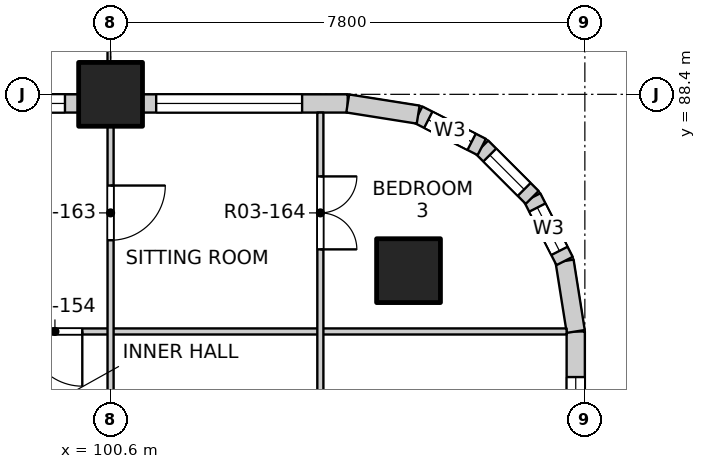
"""IFC4 building model, lengths in metres.
Left out: names, types, materials, properties, quantities, classifications, styles, units other than length and angle.
Written with IfcOpenShell. Run it as: python <this file> out.ifc"""

import sys

from ifc_helpers import new_model, si_unit, direction, frame, frame_2d, origin, origin_2d, place, context, subcontext, project, spatial, rectangle, extrude, element, fill, save


model = new_model("IFC4")
c1 = context("Model", 3, precision=1e-05, world=origin(), true_north=direction((0.0, 1.0)))
c2 = subcontext(c1, "Body", "Model", "MODEL_VIEW")
j1 = project(units=[si_unit("LENGTHUNIT", "METRE"), si_unit("PLANEANGLEUNIT", "RADIAN")], contexts=[c1])
p1 = place(None, origin())
s1 = spatial("IfcSite", under=j1, at=p1, CompositionType="ELEMENT")
p2 = place(p1, origin())
s2 = spatial("IfcBuilding", under=s1, at=p2, CompositionType="ELEMENT")
p3 = place(p2, frame((0.0, 0.0, 39.9)))
s3 = spatial("IfcBuildingStorey", under=s2, at=p3, CompositionType="ELEMENT", Elevation=39.9)
for number, where, z_axis, x_axis in (
    (1, (105.5, 85.5, -0.25), (0.0, 0.0, 1.0), (1.0, 0.0, 0.0)),
    (2, (100.6, 88.4, -0.25), (0.0, 0.0, 1.0), (1.0, 0.0, 0.0)),
):
    element("IfcColumn", number, at=place(p3, frame(where, z_axis=z_axis, x_axis=x_axis)), inside=s3, PredefinedType="COLUMN", context=c2, shape_type="SweptSolid", body=[
        extrude(rectangle(XDim=1.05, YDim=1.05, at=origin_2d()), origin(), (0.0, 0.0, 1.0), 3.4),
    ])
p4 = place(p3, frame((108.25, 81.125, 0.0), z_axis=(0.0, 0.0, 1.0), x_axis=(0.0, 1.0, 0.0)))
e3 = element("IfcWall", 3, at=p4, inside=s3, PredefinedType="SOLIDWALL", context=c2, shape_type="SweptSolid", body=[
    extrude(rectangle(XDim=3.375, YDim=0.3, at=frame_2d((1.688, 0.0))), origin(), (0.0, 0.0, 1.0), 2.7),
])
p5 = place(p4, frame((0.225, 0.0, 0.9)))
e4 = element("IfcOpeningElement", 4, at=p5, cuts=e3, PredefinedType="OPENING", context=c2, shape_type="SweptSolid", body=[
    extrude(rectangle(XDim=2.4, YDim=1.8, at=frame_2d((1.2, 0.9))), frame((0.0, 0.16, 0.0), z_axis=(0.0, -1.0, 0.0), x_axis=(1.0, 0.0, 0.0)), (0.0, 0.0, 1.0), 0.32),
])
p6 = place(p3, frame((93.325, 88.25, 0.0), z_axis=(0.0, 0.0, 1.0), x_axis=(1.0, 0.0, 0.0)))
e5 = element("IfcWall", 5, at=p6, inside=s3, PredefinedType="SOLIDWALL", context=c2, shape_type="SweptSolid", body=[
    extrude(rectangle(XDim=6.75, YDim=0.3, at=frame_2d((3.375, 0.0))), origin(), (0.0, 0.0, 1.0), 2.7),
])
p7 = place(p6, frame((0.525, 0.0, 0.0)))
e6 = element("IfcOpeningElement", 6, at=p7, cuts=e5, PredefinedType="OPENING", context=c2, shape_type="SweptSolid", body=[
    extrude(rectangle(XDim=1.8, YDim=2.4, at=frame_2d((0.9, 1.2))), frame((0.0, 0.16, 0.0), z_axis=(0.0, -1.0, 0.0), x_axis=(1.0, 0.0, 0.0)), (0.0, 0.0, 1.0), 0.32),
])
p8 = place(p6, frame((4.125, 0.0, 0.9)))
e7 = element("IfcOpeningElement", 7, at=p8, cuts=e5, PredefinedType="OPENING", context=c2, shape_type="SweptSolid", body=[
    extrude(rectangle(XDim=2.4, YDim=1.8, at=frame_2d((1.2, 0.9))), frame((0.0, 0.16, 0.0), z_axis=(0.0, -1.0, 0.0), x_axis=(1.0, 0.0, 0.0)), (0.0, 0.0, 1.0), 0.32),
])
p9 = place(p3, frame((101.125, 88.25, 0.0), z_axis=(0.0, 0.0, 1.0), x_axis=(1.0, 0.0, 0.0)))
e8 = element("IfcWall", 8, at=p9, inside=s3, PredefinedType="SOLIDWALL", context=c2, shape_type="SweptSolid", body=[
    extrude(rectangle(XDim=3.375, YDim=0.3, at=frame_2d((1.688, 0.0))), origin(), (0.0, 0.0, 1.0), 2.7),
])
p10 = place(p9, frame((0.225, 0.0, 0.9)))
e9 = element("IfcOpeningElement", 9, at=p10, cuts=e8, PredefinedType="OPENING", context=c2, shape_type="SweptSolid", body=[
    extrude(rectangle(XDim=2.4, YDim=1.8, at=frame_2d((1.2, 0.9))), frame((0.0, 0.16, 0.0), z_axis=(0.0, -1.0, 0.0), x_axis=(1.0, 0.0, 0.0)), (0.0, 0.0, 1.0), 0.32),
])
p11 = place(p3, frame((108.25, 84.5, 0.0), z_axis=(0.0, 0.0, 1.0), x_axis=(-0.156496880861, 0.987678452879, 0.0)))
e10 = element("IfcWall", 10, at=p11, inside=s3, PredefinedType="SOLIDWALL", context=c2, shape_type="SweptSolid", body=[
    extrude(rectangle(XDim=1.173, YDim=0.3, at=frame_2d((0.586, 0.0))), origin(), (0.0, 0.0, 1.0), 2.7),
])
p12 = place(p3, frame((108.066, 85.659, 0.0), z_axis=(0.0, 0.0, 1.0), x_axis=(-0.454025524128, 0.890988677504, 0.0)))
e11 = element("IfcWall", 11, at=p12, inside=s3, PredefinedType="SOLIDWALL", context=c2, shape_type="SweptSolid", body=[
    extrude(rectangle(XDim=1.173, YDim=0.3, at=frame_2d((0.587, 0.0))), origin(), (0.0, 0.0, 1.0), 2.7),
])
p13 = place(p12, frame((0.187, 0.0, 0.9)))
e12 = element("IfcOpeningElement", 12, at=p13, cuts=e11, PredefinedType="OPENING", context=c2, shape_type="SweptSolid", body=[
    extrude(rectangle(XDim=0.8, YDim=1.2, at=frame_2d((0.4, 0.6))), frame((0.0, 0.16, 0.0), z_axis=(0.0, -1.0, 0.0), x_axis=(1.0, 0.0, 0.0)), (0.0, 0.0, 1.0), 0.32),
])
p14 = place(p3, frame((107.534, 86.704, 0.0), z_axis=(0.0, 0.0, 1.0), x_axis=(-0.707106781187, 0.707106781187, 0.0)))
e13 = element("IfcWall", 13, at=p14, inside=s3, PredefinedType="SOLIDWALL", context=c2, shape_type="SweptSolid", body=[
    extrude(rectangle(XDim=1.173, YDim=0.3, at=frame_2d((0.586, 0.0))), origin(), (0.0, 0.0, 1.0), 2.7),
])
p15 = place(p14, frame((0.187, 0.0, 0.9)))
e14 = element("IfcOpeningElement", 14, at=p15, cuts=e13, PredefinedType="OPENING", context=c2, shape_type="SweptSolid", body=[
    extrude(rectangle(XDim=0.8, YDim=1.2, at=frame_2d((0.4, 0.6))), frame((0.0, 0.16, 0.0), z_axis=(0.0, -1.0, 0.0), x_axis=(1.0, 0.0, 0.0)), (0.0, 0.0, 1.0), 0.32),
])
p16 = place(p3, frame((106.704, 87.534, 0.0), z_axis=(0.0, 0.0, 1.0), x_axis=(-0.890988677504, 0.454025524128, 0.0)))
e15 = element("IfcWall", 15, at=p16, inside=s3, PredefinedType="SOLIDWALL", context=c2, shape_type="SweptSolid", body=[
    extrude(rectangle(XDim=1.173, YDim=0.3, at=frame_2d((0.587, 0.0))), origin(), (0.0, 0.0, 1.0), 2.7),
])
p17 = place(p16, frame((0.187, 0.0, 0.9)))
e16 = element("IfcOpeningElement", 16, at=p17, cuts=e15, PredefinedType="OPENING", context=c2, shape_type="SweptSolid", body=[
    extrude(rectangle(XDim=0.8, YDim=1.2, at=frame_2d((0.4, 0.6))), frame((0.0, 0.16, 0.0), z_axis=(0.0, -1.0, 0.0), x_axis=(1.0, 0.0, 0.0)), (0.0, 0.0, 1.0), 0.32),
])
p18 = place(p3, frame((105.659, 88.066, 0.0), z_axis=(0.0, 0.0, 1.0), x_axis=(-0.987678452879, 0.156496880861, 0.0)))
e17 = element("IfcWall", 17, at=p18, inside=s3, PredefinedType="SOLIDWALL", context=c2, shape_type="SweptSolid", body=[
    extrude(rectangle(XDim=1.173, YDim=0.3, at=frame_2d((0.586, 0.0))), origin(), (0.0, 0.0, 1.0), 2.7),
])
p19 = place(p3, frame((96.6, 84.5, 0.0), z_axis=(0.0, 0.0, 1.0), x_axis=(1.0, 0.0, 0.0)))
e18 = element("IfcWall", 18, at=p19, inside=s3, PredefinedType="PARTITIONING", context=c2, shape_type="SweptSolid", body=[
    extrude(rectangle(XDim=11.5, YDim=0.1, at=frame_2d((5.75, 0.0))), origin(), (0.0, 0.0, 1.0), 3.15),
])
p20 = place(p19, frame((2.635, 0.0, 0.0)))
e19 = element("IfcOpeningElement", 19, at=p20, cuts=e18, PredefinedType="OPENING", context=c2, shape_type="SweptSolid", body=[
    extrude(rectangle(XDim=0.9, YDim=2.1, at=frame_2d((0.45, 1.05))), frame((0.0, 0.06, 0.0), z_axis=(0.0, -1.0, 0.0), x_axis=(1.0, 0.0, 0.0)), (0.0, 0.0, 1.0), 0.12),
])
p21 = place(p3, frame((100.6, 80.6, 0.0), z_axis=(0.0, 0.0, 1.0), x_axis=(0.0, 1.0, 0.0)))
e20 = element("IfcWall", 20, at=p21, inside=s3, PredefinedType="PARTITIONING", context=c2, shape_type="SweptSolid", body=[
    extrude(rectangle(XDim=7.5, YDim=0.1, at=frame_2d((3.75, 0.0))), origin(), (0.0, 0.0, 1.0), 2.55),
])
p22 = place(p21, frame((1.5, 0.0, 0.0)))
e21 = element("IfcOpeningElement", 21, at=p22, cuts=e20, PredefinedType="OPENING", context=c2, shape_type="SweptSolid", body=[
    extrude(rectangle(XDim=0.9, YDim=2.1, at=frame_2d((0.45, 1.05))), frame((0.0, 0.06, 0.0), z_axis=(0.0, -1.0, 0.0), x_axis=(1.0, 0.0, 0.0)), (0.0, 0.0, 1.0), 0.12),
])
p23 = place(p21, frame((5.4, 0.0, 0.0)))
e22 = element("IfcOpeningElement", 22, at=p23, cuts=e20, PredefinedType="OPENING", context=c2, shape_type="SweptSolid", body=[
    extrude(rectangle(XDim=0.9, YDim=2.1, at=frame_2d((0.45, 1.05))), frame((0.0, 0.06, 0.0), z_axis=(0.0, -1.0, 0.0), x_axis=(1.0, 0.0, 0.0)), (0.0, 0.0, 1.0), 0.12),
])
p24 = place(p3, frame((104.05, 41.9, 0.0), z_axis=(0.0, 0.0, 1.0), x_axis=(0.0, 1.0, 0.0)))
e23 = element("IfcWall", 23, at=p24, inside=s3, PredefinedType="PARTITIONING", context=c2, shape_type="SweptSolid", body=[
    extrude(rectangle(XDim=46.2, YDim=0.1, at=frame_2d((23.1, 0.0))), origin(), (0.0, 0.0, 1.0), 3.15),
])
p25 = place(p24, frame((1.05, 0.0, 0.0)))
e24 = element("IfcOpeningElement", 24, at=p25, cuts=e23, PredefinedType="OPENING", context=c2, shape_type="SweptSolid", body=[
    extrude(rectangle(XDim=1.2, YDim=2.1, at=frame_2d((0.6, 1.05))), frame((0.0, 0.06, 0.0), z_axis=(0.0, -1.0, 0.0), x_axis=(1.0, 0.0, 0.0)), (0.0, 0.0, 1.0), 0.12),
])
p26 = place(p24, frame((4.125, 0.0, 0.0)))
e25 = element("IfcOpeningElement", 25, at=p26, cuts=e23, PredefinedType="OPENING", context=c2, shape_type="SweptSolid", body=[
    extrude(rectangle(XDim=0.9, YDim=2.1, at=frame_2d((0.45, 1.05))), frame((0.0, 0.06, 0.0), z_axis=(0.0, -1.0, 0.0), x_axis=(1.0, 0.0, 0.0)), (0.0, 0.0, 1.0), 0.12),
])
p27 = place(p24, frame((6.075, 0.0, 0.0)))
e26 = element("IfcOpeningElement", 26, at=p27, cuts=e23, PredefinedType="OPENING", context=c2, shape_type="SweptSolid", body=[
    extrude(rectangle(XDim=0.9, YDim=2.1, at=frame_2d((0.45, 1.05))), frame((0.0, 0.06, 0.0), z_axis=(0.0, -1.0, 0.0), x_axis=(1.0, 0.0, 0.0)), (0.0, 0.0, 1.0), 0.12),
])
p28 = place(p24, frame((8.85, 0.0, 0.0)))
e27 = element("IfcOpeningElement", 27, at=p28, cuts=e23, PredefinedType="OPENING", context=c2, shape_type="SweptSolid", body=[
    extrude(rectangle(XDim=1.2, YDim=2.1, at=frame_2d((0.6, 1.05))), frame((0.0, 0.06, 0.0), z_axis=(0.0, -1.0, 0.0), x_axis=(1.0, 0.0, 0.0)), (0.0, 0.0, 1.0), 0.12),
])
p29 = place(p24, frame((11.925, 0.0, 0.0)))
e28 = element("IfcOpeningElement", 28, at=p29, cuts=e23, PredefinedType="OPENING", context=c2, shape_type="SweptSolid", body=[
    extrude(rectangle(XDim=0.9, YDim=2.1, at=frame_2d((0.45, 1.05))), frame((0.0, 0.06, 0.0), z_axis=(0.0, -1.0, 0.0), x_axis=(1.0, 0.0, 0.0)), (0.0, 0.0, 1.0), 0.12),
])
p30 = place(p24, frame((13.875, 0.0, 0.0)))
e29 = element("IfcOpeningElement", 29, at=p30, cuts=e23, PredefinedType="OPENING", context=c2, shape_type="SweptSolid", body=[
    extrude(rectangle(XDim=0.9, YDim=2.1, at=frame_2d((0.45, 1.05))), frame((0.0, 0.06, 0.0), z_axis=(0.0, -1.0, 0.0), x_axis=(1.0, 0.0, 0.0)), (0.0, 0.0, 1.0), 0.12),
])
p31 = place(p24, frame((15.825, 0.0, 0.0)))
e30 = element("IfcOpeningElement", 30, at=p31, cuts=e23, PredefinedType="OPENING", context=c2, shape_type="SweptSolid", body=[
    extrude(rectangle(XDim=0.9, YDim=2.1, at=frame_2d((0.45, 1.05))), frame((0.0, 0.06, 0.0), z_axis=(0.0, -1.0, 0.0), x_axis=(1.0, 0.0, 0.0)), (0.0, 0.0, 1.0), 0.12),
])
p32 = place(p24, frame((17.775, 0.0, 0.0)))
e31 = element("IfcOpeningElement", 31, at=p32, cuts=e23, PredefinedType="OPENING", context=c2, shape_type="SweptSolid", body=[
    extrude(rectangle(XDim=0.9, YDim=2.1, at=frame_2d((0.45, 1.05))), frame((0.0, 0.06, 0.0), z_axis=(0.0, -1.0, 0.0), x_axis=(1.0, 0.0, 0.0)), (0.0, 0.0, 1.0), 0.12),
])
p33 = place(p24, frame((19.725, 0.0, 0.0)))
e32 = element("IfcOpeningElement", 32, at=p33, cuts=e23, PredefinedType="OPENING", context=c2, shape_type="SweptSolid", body=[
    extrude(rectangle(XDim=0.9, YDim=2.1, at=frame_2d((0.45, 1.05))), frame((0.0, 0.06, 0.0), z_axis=(0.0, -1.0, 0.0), x_axis=(1.0, 0.0, 0.0)), (0.0, 0.0, 1.0), 0.12),
])
p34 = place(p24, frame((21.675, 0.0, 0.0)))
e33 = element("IfcOpeningElement", 33, at=p34, cuts=e23, PredefinedType="OPENING", context=c2, shape_type="SweptSolid", body=[
    extrude(rectangle(XDim=0.9, YDim=2.1, at=frame_2d((0.45, 1.05))), frame((0.0, 0.06, 0.0), z_axis=(0.0, -1.0, 0.0), x_axis=(1.0, 0.0, 0.0)), (0.0, 0.0, 1.0), 0.12),
])
p35 = place(p24, frame((24.45, 0.0, 0.0)))
e34 = element("IfcOpeningElement", 34, at=p35, cuts=e23, PredefinedType="OPENING", context=c2, shape_type="SweptSolid", body=[
    extrude(rectangle(XDim=1.2, YDim=2.1, at=frame_2d((0.6, 1.05))), frame((0.0, 0.06, 0.0), z_axis=(0.0, -1.0, 0.0), x_axis=(1.0, 0.0, 0.0)), (0.0, 0.0, 1.0), 0.12),
])
p36 = place(p24, frame((28.35, 0.0, 0.0)))
e35 = element("IfcOpeningElement", 35, at=p36, cuts=e23, PredefinedType="OPENING", context=c2, shape_type="SweptSolid", body=[
    extrude(rectangle(XDim=1.2, YDim=2.1, at=frame_2d((0.6, 1.05))), frame((0.0, 0.06, 0.0), z_axis=(0.0, -1.0, 0.0), x_axis=(1.0, 0.0, 0.0)), (0.0, 0.0, 1.0), 0.12),
])
p37 = place(p24, frame((31.425, 0.0, 0.0)))
e36 = element("IfcOpeningElement", 36, at=p37, cuts=e23, PredefinedType="OPENING", context=c2, shape_type="SweptSolid", body=[
    extrude(rectangle(XDim=0.9, YDim=2.1, at=frame_2d((0.45, 1.05))), frame((0.0, 0.06, 0.0), z_axis=(0.0, -1.0, 0.0), x_axis=(1.0, 0.0, 0.0)), (0.0, 0.0, 1.0), 0.12),
])
p38 = place(p24, frame((33.375, 0.0, 0.0)))
e37 = element("IfcOpeningElement", 37, at=p38, cuts=e23, PredefinedType="OPENING", context=c2, shape_type="SweptSolid", body=[
    extrude(rectangle(XDim=0.9, YDim=2.1, at=frame_2d((0.45, 1.05))), frame((0.0, 0.06, 0.0), z_axis=(0.0, -1.0, 0.0), x_axis=(1.0, 0.0, 0.0)), (0.0, 0.0, 1.0), 0.12),
])
p39 = place(p24, frame((35.325, 0.0, 0.0)))
e38 = element("IfcOpeningElement", 38, at=p39, cuts=e23, PredefinedType="OPENING", context=c2, shape_type="SweptSolid", body=[
    extrude(rectangle(XDim=0.9, YDim=2.1, at=frame_2d((0.45, 1.05))), frame((0.0, 0.06, 0.0), z_axis=(0.0, -1.0, 0.0), x_axis=(1.0, 0.0, 0.0)), (0.0, 0.0, 1.0), 0.12),
])
p40 = place(p24, frame((37.275, 0.0, 0.0)))
e39 = element("IfcOpeningElement", 39, at=p40, cuts=e23, PredefinedType="OPENING", context=c2, shape_type="SweptSolid", body=[
    extrude(rectangle(XDim=0.9, YDim=2.1, at=frame_2d((0.45, 1.05))), frame((0.0, 0.06, 0.0), z_axis=(0.0, -1.0, 0.0), x_axis=(1.0, 0.0, 0.0)), (0.0, 0.0, 1.0), 0.12),
])
p41 = place(p24, frame((40.05, 0.0, 0.0)))
e40 = element("IfcOpeningElement", 40, at=p41, cuts=e23, PredefinedType="OPENING", context=c2, shape_type="SweptSolid", body=[
    extrude(rectangle(XDim=1.2, YDim=2.1, at=frame_2d((0.6, 1.05))), frame((0.0, 0.06, 0.0), z_axis=(0.0, -1.0, 0.0), x_axis=(1.0, 0.0, 0.0)), (0.0, 0.0, 1.0), 0.12),
])
p42 = place(p24, frame((43.95, 0.0, 0.0)))
e41 = element("IfcOpeningElement", 41, at=p42, cuts=e23, PredefinedType="OPENING", context=c2, shape_type="SweptSolid", body=[
    extrude(rectangle(XDim=1.2, YDim=2.1, at=frame_2d((0.6, 1.05))), frame((0.0, 0.06, 0.0), z_axis=(0.0, -1.0, 0.0), x_axis=(1.0, 0.0, 0.0)), (0.0, 0.0, 1.0), 0.12),
])
p43 = place(p5, origin())
e42 = element("IfcWindow", 42, at=p43, inside=s3, PartitioningType="DOUBLE_PANEL_VERTICAL", PredefinedType="WINDOW", context=c2, shape_type="SweptSolid", body=[
    extrude(rectangle(XDim=2.4, YDim=1.8, at=frame_2d((1.2, 0.9))), frame((0.0, 0.03, 0.0), z_axis=(0.0, -1.0, 0.0), x_axis=(1.0, 0.0, 0.0)), (0.0, 0.0, 1.0), 0.06),
])
fill(e4, e42)
p44 = place(p8, origin())
e43 = element("IfcWindow", 43, at=p44, inside=s3, PartitioningType="DOUBLE_PANEL_VERTICAL", PredefinedType="WINDOW", context=c2, shape_type="SweptSolid", body=[
    extrude(rectangle(XDim=2.4, YDim=1.8, at=frame_2d((1.2, 0.9))), frame((0.0, 0.03, 0.0), z_axis=(0.0, -1.0, 0.0), x_axis=(1.0, 0.0, 0.0)), (0.0, 0.0, 1.0), 0.06),
])
fill(e7, e43)
p45 = place(p10, origin())
e44 = element("IfcWindow", 44, at=p45, inside=s3, PartitioningType="DOUBLE_PANEL_VERTICAL", PredefinedType="WINDOW", context=c2, shape_type="SweptSolid", body=[
    extrude(rectangle(XDim=2.4, YDim=1.8, at=frame_2d((1.2, 0.9))), frame((0.0, 0.03, 0.0), z_axis=(0.0, -1.0, 0.0), x_axis=(1.0, 0.0, 0.0)), (0.0, 0.0, 1.0), 0.06),
])
fill(e9, e44)
p46 = place(p13, origin())
e45 = element("IfcWindow", 45, at=p46, inside=s3, PartitioningType="SINGLE_PANEL", PredefinedType="WINDOW", context=c2, shape_type="SweptSolid", body=[
    extrude(rectangle(XDim=0.8, YDim=1.2, at=frame_2d((0.4, 0.6))), frame((0.0, 0.03, 0.0), z_axis=(0.0, -1.0, 0.0), x_axis=(1.0, 0.0, 0.0)), (0.0, 0.0, 1.0), 0.06),
])
fill(e12, e45)
p47 = place(p15, origin())
e46 = element("IfcWindow", 46, at=p47, inside=s3, PartitioningType="SINGLE_PANEL", PredefinedType="WINDOW", context=c2, shape_type="SweptSolid", body=[
    extrude(rectangle(XDim=0.8, YDim=1.2, at=frame_2d((0.4, 0.6))), frame((0.0, 0.03, 0.0), z_axis=(0.0, -1.0, 0.0), x_axis=(1.0, 0.0, 0.0)), (0.0, 0.0, 1.0), 0.06),
])
fill(e14, e46)
p48 = place(p17, origin())
e47 = element("IfcWindow", 47, at=p48, inside=s3, PartitioningType="SINGLE_PANEL", PredefinedType="WINDOW", context=c2, shape_type="SweptSolid", body=[
    extrude(rectangle(XDim=0.8, YDim=1.2, at=frame_2d((0.4, 0.6))), frame((0.0, 0.03, 0.0), z_axis=(0.0, -1.0, 0.0), x_axis=(1.0, 0.0, 0.0)), (0.0, 0.0, 1.0), 0.06),
])
fill(e16, e47)
p49 = place(p20, origin())
e48 = element("IfcDoor", 48, at=p49, inside=s3, OperationType="SINGLE_SWING_LEFT", PredefinedType="DOOR", context=c2, shape_type="SweptSolid", body=[
    extrude(rectangle(XDim=0.9, YDim=2.1, at=frame_2d((0.45, 1.05))), frame((0.0, 0.025, 0.0), z_axis=(0.0, -1.0, 0.0), x_axis=(1.0, 0.0, 0.0)), (0.0, 0.0, 1.0), 0.05),
])
fill(e19, e48)
p50 = place(p23, origin())
e49 = element("IfcDoor", 49, at=p50, inside=s3, OperationType="SINGLE_SWING_LEFT", PredefinedType="DOOR", context=c2, shape_type="SweptSolid", body=[
    extrude(rectangle(XDim=0.9, YDim=2.1, at=frame_2d((0.45, 1.05))), frame((0.0, 0.025, 0.0), z_axis=(0.0, -1.0, 0.0), x_axis=(1.0, 0.0, 0.0)), (0.0, 0.0, 1.0), 0.05),
])
fill(e22, e49)
p51 = place(p42, origin())
e50 = element("IfcDoor", 50, at=p51, inside=s3, OperationType="DOUBLE_DOOR_SINGLE_SWING", PredefinedType="DOOR", context=c2, shape_type="SweptSolid", body=[
    extrude(rectangle(XDim=1.2, YDim=2.1, at=frame_2d((0.6, 1.05))), frame((0.0, 0.025, 0.0), z_axis=(0.0, -1.0, 0.0), x_axis=(1.0, 0.0, 0.0)), (0.0, 0.0, 1.0), 0.05),
])
fill(e41, e50)
save(model, sys.argv[1])
